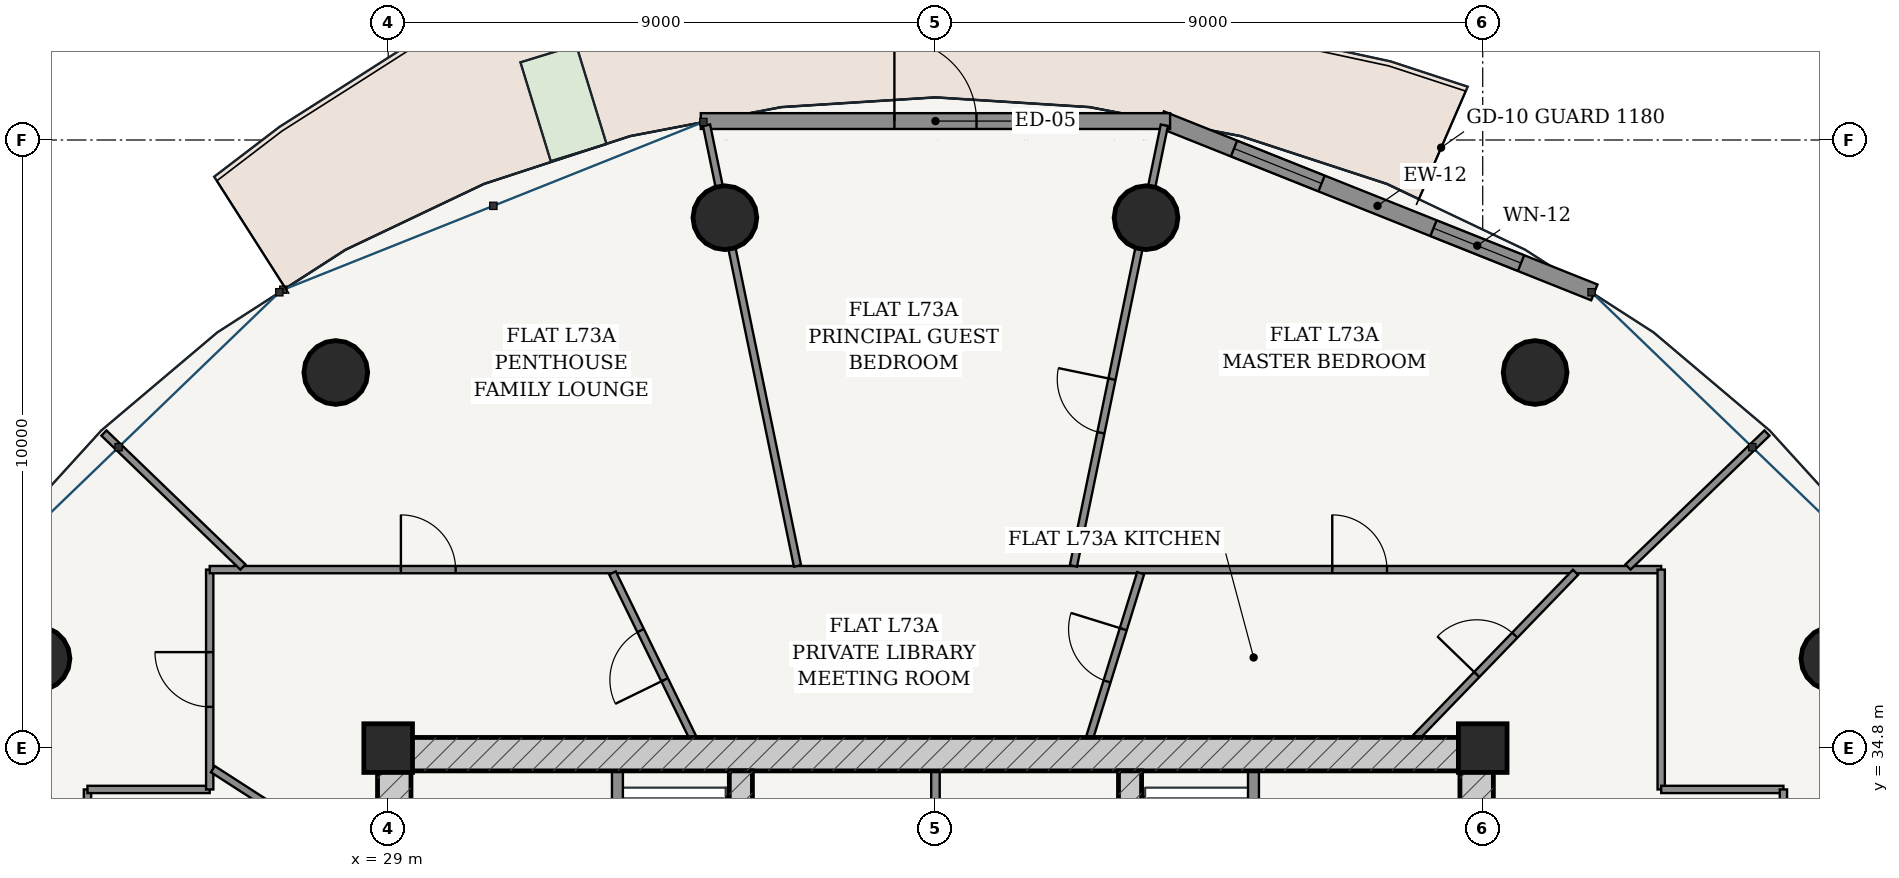
"""IFC4 building model, lengths in metres.
Left out: names, types, materials, properties, quantities, classifications, styles, units other than length and angle.
Written with IfcOpenShell. Run it as: python <this file> out.ifc"""

import sys

from ifc_helpers import new_model, si_unit, direction, frame, frame_2d, origin, origin_2d, place, context, subcontext, project, spatial, rectangle, hollow_circle, extrude, source, transform, mapped, element, fill, save


model = new_model("IFC4")
c1 = context("Model", 3, precision=1e-05, world=origin(), true_north=direction((-0.2419218956, 0.970295726276)))
c2 = subcontext(c1, "Body", "Model", "MODEL_VIEW")
j1 = project(units=[si_unit("LENGTHUNIT", "METRE"), si_unit("PLANEANGLEUNIT", "RADIAN")], contexts=[c1])
p1 = place(None, origin())
s1 = spatial("IfcSite", under=j1, at=p1, CompositionType="ELEMENT")
p2 = place(p1, origin())
s2 = spatial("IfcBuilding", under=s1, at=p2, CompositionType="ELEMENT")
p3 = place(p2, frame((0.0, 0.0, 278.2)))
s3 = spatial("IfcBuildingStorey", under=s2, at=p3, CompositionType="ELEMENT", Elevation=278.2)
for number, where, z_axis, x_axis in (
    (1, (47.0, 34.8, 0.0), (0.0, 0.0, 1.0), (1.0, 0.0, 0.0)),
    (2, (29.0, 34.8, 0.0), (0.0, 0.0, 1.0), (1.0, 0.0, 0.0)),
):
    element("IfcColumn", number, at=place(p3, frame(where, z_axis=z_axis, x_axis=x_axis)), inside=s3, PredefinedType="COLUMN", context=c2, shape_type="SweptSolid", body=[
        extrude(rectangle(XDim=0.8, YDim=0.8, at=origin_2d()), origin(), (0.0, 0.0, 1.0), 3.75),
    ])
p4 = place(p3, frame((28.825, 34.7, 0.0), z_axis=(0.0, 0.0, 1.0), x_axis=(1.0, 0.0, 0.0)))
e3 = element("IfcWall", 3, at=p4, inside=s3, PredefinedType="SHEAR", context=c2, shape_type="SweptSolid", body=[
    extrude(rectangle(XDim=18.35, YDim=0.55, at=frame_2d((9.175, 0.0))), origin(), (0.0, 0.0, 1.0), 3.49),
])
p5 = place(p3, frame((29.1, 19.175, 0.0), z_axis=(0.0, 0.0, 1.0), x_axis=(0.0, 1.0, 0.0)))
e4 = element("IfcWall", 4, at=p5, inside=s3, PredefinedType="SHEAR", context=c2, shape_type="SweptSolid", body=[
    extrude(rectangle(XDim=15.25, YDim=0.55, at=frame_2d((7.625, 0.0))), origin(), (0.0, 0.0, 1.0), 3.49),
])
p6 = place(p5, frame((9.875, 0.0, 0.0)))
e5 = element("IfcOpeningElement", 5, at=p6, cuts=e4, PredefinedType="OPENING", context=c2, shape_type="SweptSolid", body=[
    extrude(rectangle(XDim=1.5, YDim=2.2, at=frame_2d((0.75, 1.1))), frame((0.0, 0.285, 0.0), z_axis=(0.0, -1.0, 0.0), x_axis=(1.0, 0.0, 0.0)), (0.0, 0.0, 1.0), 0.57),
])
p7 = place(p3, frame((46.9, 19.175, 0.0), z_axis=(0.0, 0.0, 1.0), x_axis=(0.0, 1.0, 0.0)))
e6 = element("IfcWall", 6, at=p7, inside=s3, PredefinedType="SHEAR", context=c2, shape_type="SweptSolid", body=[
    extrude(rectangle(XDim=15.25, YDim=0.55, at=frame_2d((7.625, 0.0))), origin(), (0.0, 0.0, 1.0), 3.49),
])
p8 = place(p7, frame((9.875, 0.0, 0.0)))
e7 = element("IfcOpeningElement", 7, at=p8, cuts=e6, PredefinedType="OPENING", context=c2, shape_type="SweptSolid", body=[
    extrude(rectangle(XDim=1.5, YDim=2.2, at=frame_2d((0.75, 1.1))), frame((0.0, 0.285, 0.0), z_axis=(0.0, -1.0, 0.0), x_axis=(1.0, 0.0, 0.0)), (0.0, 0.0, 1.0), 0.57),
])
p9 = place(p3, frame((34.8, 19.175, 0.0), z_axis=(0.0, 0.0, 1.0), x_axis=(0.0, 1.0, 0.0)))
e8 = element("IfcWall", 8, at=p9, inside=s3, PredefinedType="SHEAR", context=c2, shape_type="SweptSolid", body=[
    extrude(rectangle(XDim=15.25, YDim=0.38, at=frame_2d((7.625, 0.0))), origin(), (0.0, 0.0, 1.0), 3.49),
])
p10 = place(p9, frame((7.8, 0.0, 0.0)))
e9 = element("IfcOpeningElement", 9, at=p10, cuts=e8, PredefinedType="OPENING", context=c2, shape_type="SweptSolid", body=[
    extrude(rectangle(XDim=1.05, YDim=2.15, at=frame_2d((0.525, 1.075))), frame((0.0, 0.2, 0.0), z_axis=(0.0, -1.0, 0.0), x_axis=(1.0, 0.0, 0.0)), (0.0, 0.0, 1.0), 0.4),
])
p11 = place(p3, frame((41.2, 19.175, 0.0), z_axis=(0.0, 0.0, 1.0), x_axis=(0.0, 1.0, 0.0)))
e10 = element("IfcWall", 10, at=p11, inside=s3, PredefinedType="SHEAR", context=c2, shape_type="SweptSolid", body=[
    extrude(rectangle(XDim=15.25, YDim=0.38, at=frame_2d((7.625, 0.0))), origin(), (0.0, 0.0, 1.0), 3.49),
])
p12 = place(p11, frame((7.8, 0.0, 0.0)))
e11 = element("IfcOpeningElement", 11, at=p12, cuts=e10, PredefinedType="OPENING", context=c2, shape_type="SweptSolid", body=[
    extrude(rectangle(XDim=1.05, YDim=2.15, at=frame_2d((0.525, 1.075))), frame((0.0, 0.2, 0.0), z_axis=(0.0, -1.0, 0.0), x_axis=(1.0, 0.0, 0.0)), (0.0, 0.0, 1.0), 0.4),
])
for number, where, z_axis, x_axis in (
    (12, (52.759, 36.272, 0.0), (0.0, 0.0, 1.0), (1.0, 0.0, 0.0)),
    (13, (47.861, 40.977, 0.0), (0.0, 0.0, 1.0), (1.0, 0.0, 0.0)),
    (14, (41.463, 43.522, 0.0), (0.0, 0.0, 1.0), (1.0, 0.0, 0.0)),
    (15, (34.537, 43.522, 0.0), (0.0, 0.0, 1.0), (1.0, 0.0, 0.0)),
    (16, (28.139, 40.977, 0.0), (0.0, 0.0, 1.0), (1.0, 0.0, 0.0)),
    (17, (23.241, 36.272, 0.0), (0.0, 0.0, 1.0), (1.0, 0.0, 0.0)),
):
    element("IfcColumn", number, at=place(p3, frame(where, z_axis=z_axis, x_axis=x_axis)), inside=s3, PredefinedType="COLUMN", context=c2, shape_type="SweptSolid", body=[
        extrude(hollow_circle(Radius=0.525, WallThickness=0.035, at=origin_2d()), origin(), (0.0, 0.0, 1.0), 3.75),
    ])
p13 = place(p3, frame((48.836, 42.294, 0.0), z_axis=(0.0, 0.0, 1.0), x_axis=(-0.928724272392, 0.370771123296, 0.0)))
e18 = element("IfcWall", 18, at=p13, inside=s3, PredefinedType="SOLIDWALL", context=c2, shape_type="SweptSolid", body=[
    extrude(rectangle(XDim=7.678, YDim=0.28, at=frame_2d((3.839, 0.0))), origin(), (0.0, 0.0, 1.0), 3.49),
])
p14 = place(p13, frame((1.298, 0.0, 0.85)))
e19 = element("IfcOpeningElement", 19, at=p14, cuts=e18, PredefinedType="OPENING", context=c2, shape_type="SweptSolid", body=[
    extrude(rectangle(XDim=1.55, YDim=1.95, at=frame_2d((0.775, 0.975))), frame((0.0, 0.15, 0.0), z_axis=(0.0, -1.0, 0.0), x_axis=(1.0, 0.0, 0.0)), (0.0, 0.0, 1.0), 0.3),
])
p15 = place(p13, frame((4.83, 0.0, 0.85)))
e20 = element("IfcOpeningElement", 20, at=p15, cuts=e18, PredefinedType="OPENING", context=c2, shape_type="SweptSolid", body=[
    extrude(rectangle(XDim=1.55, YDim=1.95, at=frame_2d((0.775, 0.975))), frame((0.0, 0.15, 0.0), z_axis=(0.0, -1.0, 0.0), x_axis=(1.0, 0.0, 0.0)), (0.0, 0.0, 1.0), 0.3),
])
p16 = place(p3, frame((41.859, 45.111, 0.0), z_axis=(0.0, 0.0, 1.0), x_axis=(-1.0, 0.0, 0.0)))
e21 = element("IfcWall", 21, at=p16, inside=s3, PredefinedType="SOLIDWALL", context=c2, shape_type="SweptSolid", body=[
    extrude(rectangle(XDim=7.718, YDim=0.26, at=frame_2d((3.859, 0.0))), origin(), (0.0, 0.0, 1.0), 3.49),
])
p17 = place(p16, frame((3.184, 0.0, 0.0)))
e22 = element("IfcOpeningElement", 22, at=p17, cuts=e21, PredefinedType="OPENING", context=c2, shape_type="SweptSolid", body=[
    extrude(rectangle(XDim=1.35, YDim=2.2, at=frame_2d((0.675, 1.1))), frame((0.0, 0.14, 0.0), z_axis=(0.0, -1.0, 0.0), x_axis=(1.0, 0.0, 0.0)), (0.0, 0.0, 1.0), 0.28),
])
p18 = place(p3, frame((32.77, 28.52, 0.0), z_axis=(0.0, 0.0, 1.0), x_axis=(0.0, 1.0, 0.0)))
e23 = element("IfcWall", 23, at=p18, inside=s3, PredefinedType="PARTITIONING", context=c2, shape_type="SweptSolid", body=[
    extrude(rectangle(XDim=5.905, YDim=0.18, at=frame_2d((2.953, 0.0))), origin(), (0.0, 0.0, 1.0), 3.49),
])
p19 = place(p18, frame((3.655, 0.0, 0.0)))
e24 = element("IfcOpeningElement", 24, at=p19, cuts=e23, PredefinedType="OPENING", context=c2, shape_type="SweptSolid", body=[
    extrude(rectangle(XDim=1.15, YDim=2.2, at=frame_2d((0.575, 1.1))), frame((0.0, 0.1, 0.0), z_axis=(0.0, -1.0, 0.0), x_axis=(1.0, 0.0, 0.0)), (0.0, 0.0, 1.0), 0.2),
])
p20 = place(p18, frame((0.73, 0.0, 0.0)))
e25 = element("IfcOpeningElement", 25, at=p20, cuts=e23, PredefinedType="OPENING", context=c2, shape_type="SweptSolid", body=[
    extrude(rectangle(XDim=1.2, YDim=2.25, at=frame_2d((0.6, 1.125))), frame((0.0, 0.1, 0.0), z_axis=(0.0, -1.0, 0.0), x_axis=(1.0, 0.0, 0.0)), (0.0, 0.0, 1.0), 0.2),
])
p21 = place(p3, frame((43.23, 28.52, 0.0), z_axis=(0.0, 0.0, 1.0), x_axis=(0.0, 1.0, 0.0)))
e26 = element("IfcWall", 26, at=p21, inside=s3, PredefinedType="PARTITIONING", context=c2, shape_type="SweptSolid", body=[
    extrude(rectangle(XDim=5.905, YDim=0.18, at=frame_2d((2.953, 0.0))), origin(), (0.0, 0.0, 1.0), 3.49),
])
p22 = place(p21, frame((0.905, 0.0, 0.0)))
e27 = element("IfcOpeningElement", 27, at=p22, cuts=e26, PredefinedType="OPENING", context=c2, shape_type="SweptSolid", body=[
    extrude(rectangle(XDim=0.85, YDim=2.1, at=frame_2d((0.425, 1.05))), frame((0.0, 0.1, 0.0), z_axis=(0.0, -1.0, 0.0), x_axis=(1.0, 0.0, 0.0)), (0.0, 0.0, 1.0), 0.2),
])
p23 = place(p21, frame((3.655, 0.0, 0.0)))
e28 = element("IfcOpeningElement", 28, at=p23, cuts=e26, PredefinedType="OPENING", context=c2, shape_type="SweptSolid", body=[
    extrude(rectangle(XDim=1.15, YDim=2.2, at=frame_2d((0.575, 1.1))), frame((0.0, 0.1, 0.0), z_axis=(0.0, -1.0, 0.0), x_axis=(1.0, 0.0, 0.0)), (0.0, 0.0, 1.0), 0.2),
])
p24 = place(p3, frame((38.0, 28.56, 0.0), z_axis=(0.0, 0.0, 1.0), x_axis=(0.0, 1.0, 0.0)))
e29 = element("IfcWall", 29, at=p24, inside=s3, PredefinedType="PARTITIONING", context=c2, shape_type="SweptSolid", body=[
    extrude(rectangle(XDim=5.865, YDim=0.14, at=frame_2d((2.933, 0.0))), origin(), (0.0, 0.0, 1.0), 3.49),
])
p25 = place(p3, frame((24.055, 26.902, 0.0), z_axis=(0.0, 0.0, 1.0), x_axis=(0.0, 1.0, 0.0)))
e30 = element("IfcWall", 30, at=p25, inside=s3, PredefinedType="PARTITIONING", context=c2, shape_type="SweptSolid", body=[
    extrude(rectangle(XDim=7.218, YDim=0.12, at=frame_2d((3.609, 0.0))), origin(), (0.0, 0.0, 1.0), 3.015),
])
p26 = place(p3, frame((24.055, 34.12, 0.0), z_axis=(0.0, 0.0, 1.0), x_axis=(1.0, 0.0, 0.0)))
e31 = element("IfcWall", 31, at=p26, inside=s3, PredefinedType="PARTITIONING", context=c2, shape_type="SweptSolid", body=[
    extrude(rectangle(XDim=2.01, YDim=0.12, at=frame_2d((1.005, 0.0))), origin(), (0.0, 0.0, 1.0), 3.209),
])
p27 = place(p3, frame((26.065, 34.12, 0.0), z_axis=(0.0, 0.0, 1.0), x_axis=(0.0, 1.0, 0.0)))
e32 = element("IfcWall", 32, at=p27, inside=s3, PredefinedType="PARTITIONING", context=c2, shape_type="SweptSolid", body=[
    extrude(rectangle(XDim=3.615, YDim=0.12, at=frame_2d((1.808, 0.0))), origin(), (0.0, 0.0, 1.0), 3.015),
])
p28 = place(p27, frame((1.358, 0.0, 0.0)))
e33 = element("IfcOpeningElement", 33, at=p28, cuts=e32, PredefinedType="OPENING", context=c2, shape_type="SweptSolid", body=[
    extrude(rectangle(XDim=0.9, YDim=2.15, at=frame_2d((0.45, 1.075))), frame((0.0, 0.07, 0.0), z_axis=(0.0, -1.0, 0.0), x_axis=(1.0, 0.0, 0.0)), (0.0, 0.0, 1.0), 0.14),
])
p29 = place(p3, frame((26.065, 37.735, 0.0), z_axis=(0.0, 0.0, 1.0), x_axis=(1.0, 0.0, 0.0)))
e34 = element("IfcWall", 34, at=p29, inside=s3, PredefinedType="PARTITIONING", context=c2, shape_type="SweptSolid", body=[
    extrude(rectangle(XDim=23.87, YDim=0.12, at=frame_2d((11.935, 0.0))), origin(), (0.0, 0.0, 1.0), 3.015),
])
p30 = place(p29, frame((18.46, 0.0, 0.0)))
e35 = element("IfcOpeningElement", 35, at=p30, cuts=e34, PredefinedType="OPENING", context=c2, shape_type="SweptSolid", body=[
    extrude(rectangle(XDim=0.9, YDim=2.15, at=frame_2d((0.45, 1.075))), frame((0.0, 0.07, 0.0), z_axis=(0.0, -1.0, 0.0), x_axis=(1.0, 0.0, 0.0)), (0.0, 0.0, 1.0), 0.14),
])
p31 = place(p29, frame((3.144, 0.0, 0.0)))
e36 = element("IfcOpeningElement", 36, at=p31, cuts=e34, PredefinedType="OPENING", context=c2, shape_type="SweptSolid", body=[
    extrude(rectangle(XDim=0.9, YDim=2.15, at=frame_2d((0.45, 1.075))), frame((0.0, 0.07, 0.0), z_axis=(0.0, -1.0, 0.0), x_axis=(1.0, 0.0, 0.0)), (0.0, 0.0, 1.0), 0.14),
])
p32 = place(p3, frame((49.935, 37.735, 0.0), z_axis=(0.0, 0.0, 1.0), x_axis=(0.0, -1.0, 0.0)))
e37 = element("IfcWall", 37, at=p32, inside=s3, PredefinedType="PARTITIONING", context=c2, shape_type="SweptSolid", body=[
    extrude(rectangle(XDim=3.615, YDim=0.12, at=frame_2d((1.808, 0.0))), origin(), (0.0, 0.0, 1.0), 3.015),
])
p33 = place(p3, frame((49.935, 34.12, 0.0), z_axis=(0.0, 0.0, 1.0), x_axis=(1.0, 0.0, 0.0)))
e38 = element("IfcWall", 38, at=p33, inside=s3, PredefinedType="PARTITIONING", context=c2, shape_type="SweptSolid", body=[
    extrude(rectangle(XDim=2.01, YDim=0.12, at=frame_2d((1.005, 0.0))), origin(), (0.0, 0.0, 1.0), 3.209),
])
p34 = place(p3, frame((51.945, 34.12, 0.0), z_axis=(0.0, 0.0, 1.0), x_axis=(0.0, -1.0, 0.0)))
e39 = element("IfcWall", 39, at=p34, inside=s3, PredefinedType="PARTITIONING", context=c2, shape_type="SweptSolid", body=[
    extrude(rectangle(XDim=12.786, YDim=0.12, at=frame_2d((6.393, 0.0))), origin(), (0.0, 0.0, 1.0), 3.015),
])
p35 = place(p34, frame((2.562, 0.0, 0.0)))
e40 = element("IfcOpeningElement", 40, at=p35, cuts=e39, PredefinedType="OPENING", context=c2, shape_type="SweptSolid", body=[
    extrude(rectangle(XDim=0.9, YDim=2.15, at=frame_2d((0.45, 1.075))), frame((0.0, 0.07, 0.0), z_axis=(0.0, -1.0, 0.0), x_axis=(1.0, 0.0, 0.0)), (0.0, 0.0, 1.0), 0.14),
])
p36 = place(p3, frame((49.389, 37.778, 0.0), z_axis=(0.0, 0.0, 1.0), x_axis=(0.719985652574, 0.693988948102, 0.0)))
e41 = element("IfcWall", 41, at=p36, inside=s3, PredefinedType="PARTITIONING", context=c2, shape_type="SweptSolid", body=[
    extrude(rectangle(XDim=3.174, YDim=0.12, at=frame_2d((1.587, 0.0))), origin(), (0.0, 0.0, 1.0), 3.121),
])
p37 = place(p3, frame((40.269, 37.796, 0.0), z_axis=(0.0, 0.0, 1.0), x_axis=(0.202101574245, 0.979364566281, 0.0)))
e42 = element("IfcWall", 42, at=p37, inside=s3, PredefinedType="PARTITIONING", context=c2, shape_type="SweptSolid", body=[
    extrude(rectangle(XDim=7.4, YDim=0.12, at=frame_2d((3.7, 0.0))), origin(), (0.0, 0.0, 1.0), 3.015),
])
p38 = place(p37, frame((2.236, 0.0, 0.0)))
e43 = element("IfcOpeningElement", 43, at=p38, cuts=e42, PredefinedType="OPENING", context=c2, shape_type="SweptSolid", body=[
    extrude(rectangle(XDim=0.9, YDim=2.15, at=frame_2d((0.45, 1.075))), frame((0.0, 0.07, 0.0), z_axis=(0.0, -1.0, 0.0), x_axis=(1.0, 0.0, 0.0)), (0.0, 0.0, 1.0), 0.14),
])
p39 = place(p3, frame((35.731, 37.796, 0.0), z_axis=(0.0, 0.0, 1.0), x_axis=(-0.202101574245, 0.979364566281, 0.0)))
e44 = element("IfcWall", 44, at=p39, inside=s3, PredefinedType="PARTITIONING", context=c2, shape_type="SweptSolid", body=[
    extrude(rectangle(XDim=7.4, YDim=0.12, at=frame_2d((3.7, 0.0))), origin(), (0.0, 0.0, 1.0), 3.015),
])
p40 = place(p3, frame((26.611, 37.778, 0.0), z_axis=(0.0, 0.0, 1.0), x_axis=(-0.719985652574, 0.693988948102, 0.0)))
e45 = element("IfcWall", 45, at=p40, inside=s3, PredefinedType="PARTITIONING", context=c2, shape_type="SweptSolid", body=[
    extrude(rectangle(XDim=3.174, YDim=0.12, at=frame_2d((1.587, 0.0))), origin(), (0.0, 0.0, 1.0), 3.121),
])
p41 = place(p3, frame((45.903, 34.976, 0.0), z_axis=(0.0, 0.0, 1.0), x_axis=(0.69497417129, 0.719034700999, 0.0)))
e46 = element("IfcWall", 46, at=p41, inside=s3, PredefinedType="PARTITIONING", context=c2, shape_type="SweptSolid", body=[
    extrude(rectangle(XDim=3.775, YDim=0.12, at=frame_2d((1.887, 0.0))), origin(), (0.0, 0.0, 1.0), 3.015),
])
p42 = place(p41, frame((1.437, 0.0, 0.0)))
e47 = element("IfcOpeningElement", 47, at=p42, cuts=e46, PredefinedType="OPENING", context=c2, shape_type="SweptSolid", body=[
    extrude(rectangle(XDim=0.9, YDim=2.15, at=frame_2d((0.45, 1.075))), frame((0.0, 0.07, 0.0), z_axis=(0.0, -1.0, 0.0), x_axis=(1.0, 0.0, 0.0)), (0.0, 0.0, 1.0), 0.14),
])
p43 = place(p3, frame((40.537, 34.977, 0.0), z_axis=(0.0, 0.0, 1.0), x_axis=(0.29633127961, 0.95508521752, 0.0)))
e48 = element("IfcWall", 48, at=p43, inside=s3, PredefinedType="PARTITIONING", context=c2, shape_type="SweptSolid", body=[
    extrude(rectangle(XDim=2.826, YDim=0.12, at=frame_2d((1.413, 0.0))), origin(), (0.0, 0.0, 1.0), 2.575),
])
p44 = place(p43, frame((0.963, 0.0, 0.0)))
e49 = element("IfcOpeningElement", 49, at=p44, cuts=e48, PredefinedType="OPENING", context=c2, shape_type="SweptSolid", body=[
    extrude(rectangle(XDim=0.9, YDim=2.15, at=frame_2d((0.45, 1.075))), frame((0.0, 0.07, 0.0), z_axis=(0.0, -1.0, 0.0), x_axis=(1.0, 0.0, 0.0)), (0.0, 0.0, 1.0), 0.14),
])
p45 = place(p3, frame((34.008, 34.977, 0.0), z_axis=(0.0, 0.0, 1.0), x_axis=(-0.438717914863, 0.898624833386, 0.0)))
e50 = element("IfcWall", 50, at=p45, inside=s3, PredefinedType="PARTITIONING", context=c2, shape_type="SweptSolid", body=[
    extrude(rectangle(XDim=3.007, YDim=0.12, at=frame_2d((1.504, 0.0))), origin(), (0.0, 0.0, 1.0), 3.49),
])
p46 = place(p45, frame((1.054, 0.0, 0.0)))
e51 = element("IfcOpeningElement", 51, at=p46, cuts=e50, PredefinedType="OPENING", context=c2, shape_type="SweptSolid", body=[
    extrude(rectangle(XDim=0.9, YDim=2.15, at=frame_2d((0.45, 1.075))), frame((0.0, 0.07, 0.0), z_axis=(0.0, -1.0, 0.0), x_axis=(1.0, 0.0, 0.0)), (0.0, 0.0, 1.0), 0.14),
])
p47 = place(p3, frame((28.825, 32.709, 0.0), z_axis=(0.0, 0.0, 1.0), x_axis=(-0.840692964871, 0.541512085568, 0.0)))
e52 = element("IfcWall", 52, at=p47, inside=s3, PredefinedType="PARTITIONING", context=c2, shape_type="SweptSolid", body=[
    extrude(rectangle(XDim=3.221, YDim=0.12, at=frame_2d((1.61, 0.0))), origin(), (0.0, 0.0, 1.0), 3.015),
])
p48 = place(p47, frame((1.18, 0.0, 0.0)))
e53 = element("IfcOpeningElement", 53, at=p48, cuts=e52, PredefinedType="OPENING", context=c2, shape_type="SweptSolid", body=[
    extrude(rectangle(XDim=0.86, YDim=2.15, at=frame_2d((0.43, 1.075))), frame((0.0, 0.07, 0.0), z_axis=(0.0, -1.0, 0.0), x_axis=(1.0, 0.0, 0.0)), (0.0, 0.0, 1.0), 0.14),
])
m1 = source(origin(), c2, "Body", "SweptSolid", [
    extrude(rectangle(XDim=1.55, YDim=1.95, at=frame_2d((0.775, 0.975))), frame((0.0, 0.03, 0.0), z_axis=(0.0, -1.0, 0.0), x_axis=(1.0, 0.0, 0.0)), (0.0, 0.0, 1.0), 0.06),
])
p49 = place(p14, origin())
e54 = element("IfcWindow", 54, at=p49, inside=s3, PartitioningType="SINGLE_PANEL", PredefinedType="WINDOW", context=c2, shape_type="MappedRepresentation", body=[
    mapped(m1, transform((0.0, 0.0, 0.0), scale=1.0)),
])
fill(e19, e54)
p50 = place(p15, origin())
e55 = element("IfcWindow", 55, at=p50, inside=s3, PartitioningType="SINGLE_PANEL", PredefinedType="WINDOW", context=c2, shape_type="MappedRepresentation", body=[
    mapped(m1, transform((0.0, 0.0, 0.0), scale=1.0)),
])
fill(e20, e55)
m2 = source(origin(), c2, "Body", "SweptSolid", [
    extrude(rectangle(XDim=1.35, YDim=2.2, at=frame_2d((0.675, 1.1))), frame((0.0, 0.025, 0.0), z_axis=(0.0, -1.0, 0.0), x_axis=(1.0, 0.0, 0.0)), (0.0, 0.0, 1.0), 0.05),
])
p51 = place(p17, frame((1.35, 0.0, 0.0), z_axis=(0.0, 0.0, 1.0), x_axis=(-1.0, 0.0, 0.0)))
e56 = element("IfcDoor", 56, at=p51, inside=s3, OperationType="SINGLE_SWING_LEFT", PredefinedType="DOOR", context=c2, shape_type="MappedRepresentation", body=[
    mapped(m2, transform((0.0, 0.0, 0.0), scale=1.0)),
])
fill(e22, e56)
m3 = source(origin(), c2, "Body", "SweptSolid", [
    extrude(rectangle(XDim=0.9, YDim=2.15, at=frame_2d((0.45, 1.075))), frame((0.0, 0.025, 0.0), z_axis=(0.0, -1.0, 0.0), x_axis=(1.0, 0.0, 0.0)), (0.0, 0.0, 1.0), 0.05),
])
p52 = place(p42, origin())
e57 = element("IfcDoor", 57, at=p52, inside=s3, OperationType="SINGLE_SWING_LEFT", PredefinedType="DOOR", context=c2, shape_type="MappedRepresentation", body=[
    mapped(m3, transform((0.0, 0.0, 0.0), scale=1.0)),
])
fill(e47, e57)
p53 = place(p44, origin())
e58 = element("IfcDoor", 58, at=p53, inside=s3, OperationType="SINGLE_SWING_RIGHT", PredefinedType="DOOR", context=c2, shape_type="MappedRepresentation", body=[
    mapped(m3, transform((0.0, 0.0, 0.0), scale=1.0)),
])
fill(e49, e58)
p54 = place(p46, origin())
e59 = element("IfcDoor", 59, at=p54, inside=s3, OperationType="SINGLE_SWING_LEFT", PredefinedType="DOOR", context=c2, shape_type="MappedRepresentation", body=[
    mapped(m3, transform((0.0, 0.0, 0.0), scale=1.0)),
])
fill(e51, e59)
p55 = place(p30, origin())
e60 = element("IfcDoor", 60, at=p55, inside=s3, OperationType="SINGLE_SWING_LEFT", PredefinedType="DOOR", context=c2, shape_type="MappedRepresentation", body=[
    mapped(m3, transform((0.0, 0.0, 0.0), scale=1.0)),
])
fill(e35, e60)
p56 = place(p38, origin())
e61 = element("IfcDoor", 61, at=p56, inside=s3, OperationType="SINGLE_SWING_RIGHT", PredefinedType="DOOR", context=c2, shape_type="MappedRepresentation", body=[
    mapped(m3, transform((0.0, 0.0, 0.0), scale=1.0)),
])
fill(e43, e61)
p57 = place(p31, origin())
e62 = element("IfcDoor", 62, at=p57, inside=s3, OperationType="SINGLE_SWING_LEFT", PredefinedType="DOOR", context=c2, shape_type="MappedRepresentation", body=[
    mapped(m3, transform((0.0, 0.0, 0.0), scale=1.0)),
])
fill(e36, e62)
p58 = place(p28, origin())
e63 = element("IfcDoor", 63, at=p58, inside=s3, OperationType="SINGLE_SWING_RIGHT", PredefinedType="DOOR", context=c2, shape_type="MappedRepresentation", body=[
    mapped(m3, transform((0.0, 0.0, 0.0), scale=1.0)),
])
fill(e33, e63)
save(model, sys.argv[1])
